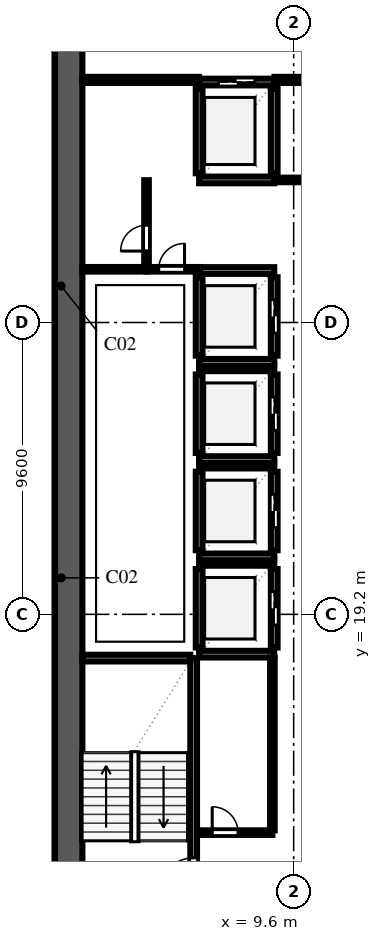
"""IFC4 building model, lengths in metres.
Left out: names, types, materials, properties, quantities, classifications, styles, units other than length and angle.
Written with IfcOpenShell. Run it as: python <this file> out.ifc"""

import sys

from ifc_helpers import new_model, si_unit, direction, frame, frame_2d, origin, place, context, subcontext, project, spatial, rectangle, extrude, element, fill, save


model = new_model("IFC4")
c1 = context("Model", 3, precision=1e-05, world=origin(), true_north=direction((0.0, 1.0)))
c2 = subcontext(c1, "Body", "Model", "MODEL_VIEW")
j1 = project(units=[si_unit("LENGTHUNIT", "METRE"), si_unit("PLANEANGLEUNIT", "RADIAN")], contexts=[c1])
p1 = place(None, origin())
s1 = spatial("IfcSite", under=j1, at=p1, CompositionType="ELEMENT")
p2 = place(p1, origin())
s2 = spatial("IfcBuilding", under=s1, at=p2, CompositionType="ELEMENT")
p3 = place(p2, frame((0.0, 0.0, 39.4)))
s3 = spatial("IfcBuildingStorey", under=s2, at=p3, CompositionType="ELEMENT", Elevation=39.4)
p4 = place(p3, frame((2.2, 9.15, 0.0), z_axis=(0.0, 0.0, 1.0), x_axis=(0.0, 1.0, 0.0)))
e1 = element("IfcWall", 1, at=p4, inside=s3, PredefinedType="SHEAR", context=c2, shape_type="SweptSolid", body=[
    extrude(rectangle(XDim=39.3, YDim=0.9, at=frame_2d((19.65, 0.0))), origin(), (0.0, 0.0, 1.0), 3.54),
])
p5 = place(p3, frame((6.31, 9.95, 0.0), z_axis=(0.0, 0.0, 1.0), x_axis=(0.0, 1.0, 0.0)))
e2 = element("IfcWall", 2, at=p5, inside=s3, PredefinedType="SOLIDWALL", context=c2, shape_type="SweptSolid", body=[
    extrude(rectangle(XDim=7.81, YDim=0.22, at=frame_2d((3.905, 0.0))), origin(), (0.0, 0.0, 1.0), 3.54),
])
p6 = place(p5, frame((0.14, 0.0, 0.0)))
e3 = element("IfcOpeningElement", 3, at=p6, cuts=e2, PredefinedType="OPENING", context=c2, shape_type="SweptSolid", body=[
    extrude(rectangle(XDim=1.1, YDim=2.2, at=frame_2d((0.55, 1.1))), frame((0.0, 0.122, 0.0), z_axis=(0.0, -1.0, 0.0), x_axis=(1.0, 0.0, 0.0)), (0.0, 0.0, 1.0), 0.244),
])
p7 = place(p3, frame((2.65, 17.76, 0.0), z_axis=(0.0, 0.0, 1.0), x_axis=(1.0, 0.0, 0.0)))
e4 = element("IfcWall", 4, at=p7, inside=s3, PredefinedType="SOLIDWALL", context=c2, shape_type="SweptSolid", body=[
    extrude(rectangle(XDim=3.55, YDim=0.22, at=frame_2d((1.775, 0.0))), origin(), (0.0, 0.0, 1.0), 3.54),
])
p8 = place(p3, frame((6.49, 18.11, 0.0), z_axis=(0.0, 0.0, 1.0), x_axis=(0.0, 1.0, 0.0)))
e5 = element("IfcWall", 5, at=p8, inside=s3, PredefinedType="SOLIDWALL", context=c2, shape_type="SweptSolid", body=[
    extrude(rectangle(XDim=2.58, YDim=0.22, at=frame_2d((1.29, 0.0))), origin(), (0.0, 0.0, 1.0), 3.54),
])
p9 = place(p3, frame((8.96, 18.11, 0.0), z_axis=(0.0, 0.0, 1.0), x_axis=(0.0, 1.0, 0.0)))
e6 = element("IfcWall", 6, at=p9, inside=s3, PredefinedType="SOLIDWALL", context=c2, shape_type="SweptSolid", body=[
    extrude(rectangle(XDim=2.58, YDim=0.22, at=frame_2d((1.29, 0.0))), origin(), (0.0, 0.0, 1.0), 3.54),
])
p10 = place(p9, frame((0.74, 0.0, 0.0)))
e7 = element("IfcOpeningElement", 7, at=p10, cuts=e6, PredefinedType="OPENING", context=c2, shape_type="SweptSolid", body=[
    extrude(rectangle(XDim=1.1, YDim=2.2, at=frame_2d((0.55, 1.1))), frame((0.0, 0.122, 0.0), z_axis=(0.0, -1.0, 0.0), x_axis=(1.0, 0.0, 0.0)), (0.0, 0.0, 1.0), 0.244),
])
for number, where, z_axis, x_axis in (
    (8, (6.49, 17.89, 0.0), (0.0, 0.0, 1.0), (1.0, 0.0, 0.0)),
    (9, (6.49, 20.91, 0.0), (0.0, 0.0, 1.0), (1.0, 0.0, 0.0)),
):
    element("IfcWall", number, at=place(p3, frame(where, z_axis=z_axis, x_axis=x_axis)), inside=s3, PredefinedType="SOLIDWALL", context=c2, shape_type="SweptSolid", body=[
        extrude(rectangle(XDim=2.47, YDim=0.22, at=frame_2d((1.235, 0.0))), origin(), (0.0, 0.0, 1.0), 3.54),
    ])
p11 = place(p3, frame((6.49, 21.31, 0.0), z_axis=(0.0, 0.0, 1.0), x_axis=(0.0, 1.0, 0.0)))
e10 = element("IfcWall", 10, at=p11, inside=s3, PredefinedType="SOLIDWALL", context=c2, shape_type="SweptSolid", body=[
    extrude(rectangle(XDim=2.58, YDim=0.22, at=frame_2d((1.29, 0.0))), origin(), (0.0, 0.0, 1.0), 3.54),
])
p12 = place(p3, frame((8.96, 21.31, 0.0), z_axis=(0.0, 0.0, 1.0), x_axis=(0.0, 1.0, 0.0)))
e11 = element("IfcWall", 11, at=p12, inside=s3, PredefinedType="SOLIDWALL", context=c2, shape_type="SweptSolid", body=[
    extrude(rectangle(XDim=2.58, YDim=0.22, at=frame_2d((1.29, 0.0))), origin(), (0.0, 0.0, 1.0), 3.54),
])
p13 = place(p12, frame((0.74, 0.0, 0.0)))
e12 = element("IfcOpeningElement", 12, at=p13, cuts=e11, PredefinedType="OPENING", context=c2, shape_type="SweptSolid", body=[
    extrude(rectangle(XDim=1.1, YDim=2.2, at=frame_2d((0.55, 1.1))), frame((0.0, 0.122, 0.0), z_axis=(0.0, -1.0, 0.0), x_axis=(1.0, 0.0, 0.0)), (0.0, 0.0, 1.0), 0.244),
])
for number, where, z_axis, x_axis in (
    (13, (6.49, 21.09, 0.0), (0.0, 0.0, 1.0), (1.0, 0.0, 0.0)),
    (14, (6.49, 24.11, 0.0), (0.0, 0.0, 1.0), (1.0, 0.0, 0.0)),
):
    element("IfcWall", number, at=place(p3, frame(where, z_axis=z_axis, x_axis=x_axis)), inside=s3, PredefinedType="SOLIDWALL", context=c2, shape_type="SweptSolid", body=[
        extrude(rectangle(XDim=2.47, YDim=0.22, at=frame_2d((1.235, 0.0))), origin(), (0.0, 0.0, 1.0), 3.54),
    ])
p14 = place(p3, frame((6.49, 24.51, 0.0), z_axis=(0.0, 0.0, 1.0), x_axis=(0.0, 1.0, 0.0)))
e15 = element("IfcWall", 15, at=p14, inside=s3, PredefinedType="SOLIDWALL", context=c2, shape_type="SweptSolid", body=[
    extrude(rectangle(XDim=2.58, YDim=0.22, at=frame_2d((1.29, 0.0))), origin(), (0.0, 0.0, 1.0), 3.54),
])
p15 = place(p3, frame((8.96, 24.51, 0.0), z_axis=(0.0, 0.0, 1.0), x_axis=(0.0, 1.0, 0.0)))
e16 = element("IfcWall", 16, at=p15, inside=s3, PredefinedType="SOLIDWALL", context=c2, shape_type="SweptSolid", body=[
    extrude(rectangle(XDim=2.58, YDim=0.22, at=frame_2d((1.29, 0.0))), origin(), (0.0, 0.0, 1.0), 3.54),
])
p16 = place(p15, frame((0.74, 0.0, 0.0)))
e17 = element("IfcOpeningElement", 17, at=p16, cuts=e16, PredefinedType="OPENING", context=c2, shape_type="SweptSolid", body=[
    extrude(rectangle(XDim=1.1, YDim=2.2, at=frame_2d((0.55, 1.1))), frame((0.0, 0.122, 0.0), z_axis=(0.0, -1.0, 0.0), x_axis=(1.0, 0.0, 0.0)), (0.0, 0.0, 1.0), 0.244),
])
for number, where, z_axis, x_axis in (
    (18, (6.49, 24.29, 0.0), (0.0, 0.0, 1.0), (1.0, 0.0, 0.0)),
    (19, (6.49, 27.31, 0.0), (0.0, 0.0, 1.0), (1.0, 0.0, 0.0)),
):
    element("IfcWall", number, at=place(p3, frame(where, z_axis=z_axis, x_axis=x_axis)), inside=s3, PredefinedType="SOLIDWALL", context=c2, shape_type="SweptSolid", body=[
        extrude(rectangle(XDim=2.47, YDim=0.22, at=frame_2d((1.235, 0.0))), origin(), (0.0, 0.0, 1.0), 3.54),
    ])
p17 = place(p3, frame((6.49, 27.71, 0.0), z_axis=(0.0, 0.0, 1.0), x_axis=(0.0, 1.0, 0.0)))
e20 = element("IfcWall", 20, at=p17, inside=s3, PredefinedType="SOLIDWALL", context=c2, shape_type="SweptSolid", body=[
    extrude(rectangle(XDim=2.58, YDim=0.22, at=frame_2d((1.29, 0.0))), origin(), (0.0, 0.0, 1.0), 3.54),
])
p18 = place(p3, frame((8.96, 27.71, 0.0), z_axis=(0.0, 0.0, 1.0), x_axis=(0.0, 1.0, 0.0)))
e21 = element("IfcWall", 21, at=p18, inside=s3, PredefinedType="SOLIDWALL", context=c2, shape_type="SweptSolid", body=[
    extrude(rectangle(XDim=2.58, YDim=0.22, at=frame_2d((1.29, 0.0))), origin(), (0.0, 0.0, 1.0), 3.54),
])
p19 = place(p18, frame((0.74, 0.0, 0.0)))
e22 = element("IfcOpeningElement", 22, at=p19, cuts=e21, PredefinedType="OPENING", context=c2, shape_type="SweptSolid", body=[
    extrude(rectangle(XDim=1.1, YDim=2.2, at=frame_2d((0.55, 1.1))), frame((0.0, 0.122, 0.0), z_axis=(0.0, -1.0, 0.0), x_axis=(1.0, 0.0, 0.0)), (0.0, 0.0, 1.0), 0.244),
])
for number, where, z_axis, x_axis in (
    (23, (6.49, 27.49, 0.0), (0.0, 0.0, 1.0), (1.0, 0.0, 0.0)),
    (24, (6.49, 30.51, 0.0), (0.0, 0.0, 1.0), (1.0, 0.0, 0.0)),
):
    element("IfcWall", number, at=place(p3, frame(where, z_axis=z_axis, x_axis=x_axis)), inside=s3, PredefinedType="SOLIDWALL", context=c2, shape_type="SweptSolid", body=[
        extrude(rectangle(XDim=2.47, YDim=0.22, at=frame_2d((1.235, 0.0))), origin(), (0.0, 0.0, 1.0), 3.54),
    ])
for number, where, z_axis, x_axis in (
    (25, (6.49, 33.71, 0.0), (0.0, 0.0, 1.0), (0.0, 1.0, 0.0)),
    (26, (8.96, 33.71, 0.0), (0.0, 0.0, 1.0), (0.0, 1.0, 0.0)),
):
    element("IfcWall", number, at=place(p3, frame(where, z_axis=z_axis, x_axis=x_axis)), inside=s3, PredefinedType="SOLIDWALL", context=c2, shape_type="SweptSolid", body=[
        extrude(rectangle(XDim=2.78, YDim=0.22, at=frame_2d((1.39, 0.0))), origin(), (0.0, 0.0, 1.0), 3.54),
    ])
p20 = place(p3, frame((6.49, 33.49, 0.0), z_axis=(0.0, 0.0, 1.0), x_axis=(1.0, 0.0, 0.0)))
e27 = element("IfcWall", 27, at=p20, inside=s3, PredefinedType="SOLIDWALL", context=c2, shape_type="SweptSolid", body=[
    extrude(rectangle(XDim=2.47, YDim=0.22, at=frame_2d((1.235, 0.0))), origin(), (0.0, 0.0, 1.0), 3.54),
])
p21 = place(p3, frame((6.49, 36.71, 0.0), z_axis=(0.0, 0.0, 1.0), x_axis=(1.0, 0.0, 0.0)))
e28 = element("IfcWall", 28, at=p21, inside=s3, PredefinedType="SOLIDWALL", context=c2, shape_type="SweptSolid", body=[
    extrude(rectangle(XDim=2.47, YDim=0.22, at=frame_2d((1.235, 0.0))), origin(), (0.0, 0.0, 1.0), 3.54),
])
p22 = place(p21, frame((0.635, 0.0, 0.0)))
e29 = element("IfcOpeningElement", 29, at=p22, cuts=e28, PredefinedType="OPENING", context=c2, shape_type="SweptSolid", body=[
    extrude(rectangle(XDim=1.2, YDim=2.2, at=frame_2d((0.6, 1.1))), frame((0.0, 0.122, 0.0), z_axis=(0.0, -1.0, 0.0), x_axis=(1.0, 0.0, 0.0)), (0.0, 0.0, 1.0), 0.244),
])
p23 = place(p3, frame((2.65, 36.78, 0.0), z_axis=(0.0, 0.0, 1.0), x_axis=(1.0, 0.0, 0.0)))
e30 = element("IfcWall", 30, at=p23, inside=s3, PredefinedType="SOLIDWALL", context=c2, shape_type="SweptSolid", body=[
    extrude(rectangle(XDim=3.83, YDim=0.2, at=frame_2d((1.915, 0.0))), origin(), (0.0, 0.0, 1.0), 3.54),
])
p24 = place(p3, frame((8.97, 36.78, 0.0), z_axis=(0.0, 0.0, 1.0), x_axis=(1.0, 0.0, 0.0)))
e31 = element("IfcWall", 31, at=p24, inside=s3, PredefinedType="SOLIDWALL", context=c2, shape_type="SweptSolid", body=[
    extrude(rectangle(XDim=1.51, YDim=0.2, at=frame_2d((0.755, 0.0))), origin(), (0.0, 0.0, 1.0), 3.54),
])
p25 = place(p3, frame((8.965, 33.49, 0.0), z_axis=(0.0, 0.0, 1.0), x_axis=(1.0, 0.0, 0.0)))
e32 = element("IfcWall", 32, at=p25, inside=s3, PredefinedType="PARTITIONING", context=c2, shape_type="SweptSolid", body=[
    extrude(rectangle(XDim=1.52, YDim=0.15, at=frame_2d((0.76, 0.0))), origin(), (0.0, 0.0, 1.0), 3.54),
])
p26 = place(p3, frame((6.42, 12.02, 0.0), z_axis=(0.0, 0.0, 1.0), x_axis=(1.0, 0.0, 0.0)))
e33 = element("IfcWall", 33, at=p26, inside=s3, PredefinedType="PARTITIONING", context=c2, shape_type="SweptSolid", body=[
    extrude(rectangle(XDim=2.48, YDim=0.15, at=frame_2d((1.24, 0.0))), origin(), (0.0, 0.0, 1.0), 3.54),
])
p27 = place(p26, frame((0.5, 0.0, 0.0)))
e34 = element("IfcOpeningElement", 34, at=p27, cuts=e33, PredefinedType="OPENING", context=c2, shape_type="SweptSolid", body=[
    extrude(rectangle(XDim=0.85, YDim=2.1, at=frame_2d((0.425, 1.05))), frame((0.0, 0.087, 0.0), z_axis=(0.0, -1.0, 0.0), x_axis=(1.0, 0.0, 0.0)), (0.0, 0.0, 1.0), 0.174),
])
p28 = place(p3, frame((8.9, 12.095, 0.0), z_axis=(0.0, 0.0, 1.0), x_axis=(0.0, 1.0, 0.0)))
e35 = element("IfcWall", 35, at=p28, inside=s3, PredefinedType="PARTITIONING", context=c2, shape_type="SweptSolid", body=[
    extrude(rectangle(XDim=5.68, YDim=0.15, at=frame_2d((2.84, 0.0))), origin(), (0.0, 0.0, 1.0), 3.54),
])
p29 = place(p3, frame((4.76, 30.55, 0.0), z_axis=(0.0, 0.0, 1.0), x_axis=(0.0, 1.0, 0.0)))
e36 = element("IfcWall", 36, at=p29, inside=s3, PredefinedType="PARTITIONING", context=c2, shape_type="SweptSolid", body=[
    extrude(rectangle(XDim=2.93, YDim=0.15, at=frame_2d((1.465, 0.0))), origin(), (0.0, 0.0, 1.0), 3.54),
])
p30 = place(p29, frame((0.6, 0.0, 0.0)))
e37 = element("IfcOpeningElement", 37, at=p30, cuts=e36, PredefinedType="OPENING", context=c2, shape_type="SweptSolid", body=[
    extrude(rectangle(XDim=0.85, YDim=2.1, at=frame_2d((0.425, 1.05))), frame((0.0, 0.087, 0.0), z_axis=(0.0, -1.0, 0.0), x_axis=(1.0, 0.0, 0.0)), (0.0, 0.0, 1.0), 0.174),
])
p31 = place(p3, frame((4.76, 30.55, 0.0), z_axis=(0.0, 0.0, 1.0), x_axis=(1.0, 0.0, 0.0)))
e38 = element("IfcWall", 38, at=p31, inside=s3, PredefinedType="PARTITIONING", context=c2, shape_type="SweptSolid", body=[
    extrude(rectangle(XDim=1.76, YDim=0.15, at=frame_2d((0.88, 0.0))), origin(), (0.0, 0.0, 1.0), 3.54),
])
p32 = place(p31, frame((0.4, 0.0, 0.0)))
e39 = element("IfcOpeningElement", 39, at=p32, cuts=e38, PredefinedType="OPENING", context=c2, shape_type="SweptSolid", body=[
    extrude(rectangle(XDim=0.85, YDim=2.1, at=frame_2d((0.425, 1.05))), frame((0.0, 0.087, 0.0), z_axis=(0.0, -1.0, 0.0), x_axis=(1.0, 0.0, 0.0)), (0.0, 0.0, 1.0), 0.174),
])
p33 = place(p3, frame((2.65, 30.55, 0.0), z_axis=(0.0, 0.0, 1.0), x_axis=(1.0, 0.0, 0.0)))
e40 = element("IfcWall", 40, at=p33, inside=s3, PredefinedType="PARTITIONING", context=c2, shape_type="SweptSolid", body=[
    extrude(rectangle(XDim=2.11, YDim=0.15, at=frame_2d((1.055, 0.0))), origin(), (0.0, 0.0, 1.0), 3.54),
])
p34 = place(p6, origin())
e41 = element("IfcDoor", 41, at=p34, inside=s3, OperationType="SINGLE_SWING_LEFT", PredefinedType="DOOR", context=c2, shape_type="SweptSolid", body=[
    extrude(rectangle(XDim=1.1, YDim=2.2, at=frame_2d((0.55, 1.1))), frame((0.0, 0.025, 0.0), z_axis=(0.0, -1.0, 0.0), x_axis=(1.0, 0.0, 0.0)), (0.0, 0.0, 1.0), 0.05),
])
fill(e3, e41)
p35 = place(p10, origin())
e42 = element("IfcDoor", 42, at=p35, inside=s3, OperationType="DOUBLE_DOOR_SLIDING", PredefinedType="DOOR", context=c2, shape_type="SweptSolid", body=[
    extrude(rectangle(XDim=1.1, YDim=2.2, at=frame_2d((0.55, 1.1))), frame((0.0, 0.025, 0.0), z_axis=(0.0, -1.0, 0.0), x_axis=(1.0, 0.0, 0.0)), (0.0, 0.0, 1.0), 0.05),
])
fill(e7, e42)
p36 = place(p13, origin())
e43 = element("IfcDoor", 43, at=p36, inside=s3, OperationType="DOUBLE_DOOR_SLIDING", PredefinedType="DOOR", context=c2, shape_type="SweptSolid", body=[
    extrude(rectangle(XDim=1.1, YDim=2.2, at=frame_2d((0.55, 1.1))), frame((0.0, 0.025, 0.0), z_axis=(0.0, -1.0, 0.0), x_axis=(1.0, 0.0, 0.0)), (0.0, 0.0, 1.0), 0.05),
])
fill(e12, e43)
p37 = place(p16, origin())
e44 = element("IfcDoor", 44, at=p37, inside=s3, OperationType="DOUBLE_DOOR_SLIDING", PredefinedType="DOOR", context=c2, shape_type="SweptSolid", body=[
    extrude(rectangle(XDim=1.1, YDim=2.2, at=frame_2d((0.55, 1.1))), frame((0.0, 0.025, 0.0), z_axis=(0.0, -1.0, 0.0), x_axis=(1.0, 0.0, 0.0)), (0.0, 0.0, 1.0), 0.05),
])
fill(e17, e44)
p38 = place(p19, origin())
e45 = element("IfcDoor", 45, at=p38, inside=s3, OperationType="DOUBLE_DOOR_SLIDING", PredefinedType="DOOR", context=c2, shape_type="SweptSolid", body=[
    extrude(rectangle(XDim=1.1, YDim=2.2, at=frame_2d((0.55, 1.1))), frame((0.0, 0.025, 0.0), z_axis=(0.0, -1.0, 0.0), x_axis=(1.0, 0.0, 0.0)), (0.0, 0.0, 1.0), 0.05),
])
fill(e22, e45)
p39 = place(p22, origin())
e46 = element("IfcDoor", 46, at=p39, inside=s3, OperationType="DOUBLE_DOOR_SLIDING", PredefinedType="DOOR", context=c2, shape_type="SweptSolid", body=[
    extrude(rectangle(XDim=1.2, YDim=2.2, at=frame_2d((0.6, 1.1))), frame((0.0, 0.025, 0.0), z_axis=(0.0, -1.0, 0.0), x_axis=(1.0, 0.0, 0.0)), (0.0, 0.0, 1.0), 0.05),
])
fill(e29, e46)
p40 = place(p27, origin())
e47 = element("IfcDoor", 47, at=p40, inside=s3, OperationType="SINGLE_SWING_LEFT", PredefinedType="DOOR", context=c2, shape_type="SweptSolid", body=[
    extrude(rectangle(XDim=0.85, YDim=2.1, at=frame_2d((0.425, 1.05))), frame((0.0, 0.025, 0.0), z_axis=(0.0, -1.0, 0.0), x_axis=(1.0, 0.0, 0.0)), (0.0, 0.0, 1.0), 0.05),
])
fill(e34, e47)
p41 = place(p30, origin())
e48 = element("IfcDoor", 48, at=p41, inside=s3, OperationType="SINGLE_SWING_LEFT", PredefinedType="DOOR", context=c2, shape_type="SweptSolid", body=[
    extrude(rectangle(XDim=0.85, YDim=2.1, at=frame_2d((0.425, 1.05))), frame((0.0, 0.025, 0.0), z_axis=(0.0, -1.0, 0.0), x_axis=(1.0, 0.0, 0.0)), (0.0, 0.0, 1.0), 0.05),
])
fill(e37, e48)
p42 = place(p32, origin())
e49 = element("IfcDoor", 49, at=p42, inside=s3, OperationType="SINGLE_SWING_RIGHT", PredefinedType="DOOR", context=c2, shape_type="SweptSolid", body=[
    extrude(rectangle(XDim=0.85, YDim=2.1, at=frame_2d((0.425, 1.05))), frame((0.0, 0.025, 0.0), z_axis=(0.0, -1.0, 0.0), x_axis=(1.0, 0.0, 0.0)), (0.0, 0.0, 1.0), 0.05),
])
fill(e39, e49)
save(model, sys.argv[1])
